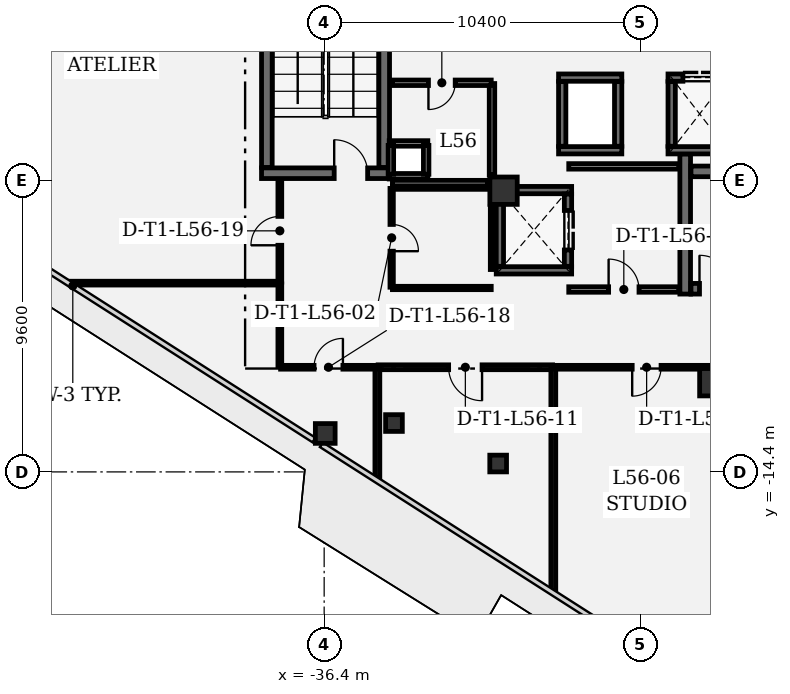
"""IFC4 building model, lengths in metres.
Left out: names, types, materials, properties, quantities, classifications, styles, units other than length and angle.
Written with IfcOpenShell. Run it as: python <this file> out.ifc"""

import sys

from ifc_helpers import new_model, si_unit, direction, frame, frame_2d, origin, origin_2d, place, context, subcontext, project, spatial, rectangle, extrude, element, fill, save


model = new_model("IFC4")
c1 = context("Model", 3, precision=1e-05, world=origin(), true_north=direction((0.0, 1.0)))
c2 = subcontext(c1, "Body", "Model", "MODEL_VIEW")
j1 = project(units=[si_unit("LENGTHUNIT", "METRE"), si_unit("PLANEANGLEUNIT", "RADIAN")], contexts=[c1])
p1 = place(None, origin())
s1 = spatial("IfcSite", under=j1, at=p1, CompositionType="ELEMENT")
p2 = place(p1, origin())
s2 = spatial("IfcBuilding", under=s1, at=p2, CompositionType="ELEMENT")
p3 = place(p2, frame((0.0, 0.0, 241.5)))
s3 = spatial("IfcBuildingStorey", under=s2, at=p3, CompositionType="ELEMENT", Elevation=241.5)
for number, where, z_axis, x_axis in (
    (1, (-23.6, -11.45, 0.0), (0.0, 0.0, 1.0), (1.0, 0.0, 0.0)),
    (2, (-30.5, -5.15, 0.0), (0.0, 0.0, 1.0), (1.0, 0.0, 0.0)),
):
    element("IfcColumn", number, at=place(p3, frame(where, z_axis=z_axis, x_axis=x_axis)), inside=s3, PredefinedType="COLUMN", context=c2, shape_type="SweptSolid", body=[
        extrude(rectangle(XDim=0.9, YDim=0.9, at=origin_2d()), origin(), (0.0, 0.0, 1.0), 4.05),
    ])
p4 = place(p3, frame((-36.365, -13.135, 0.0), z_axis=(0.0, 0.0, 1.0), x_axis=(1.0, 0.0, 0.0)))
e3 = element("IfcColumn", 3, at=p4, inside=s3, PredefinedType="COLUMN", context=c2, shape_type="SweptSolid", body=[
    extrude(rectangle(XDim=0.65, YDim=0.65, at=origin_2d()), origin(), (0.0, 0.0, 1.0), 4.05),
])
for number, where, z_axis, x_axis in (
    (4, (-34.104, -12.792, 0.0), (0.0, 0.0, 1.0), (1.0, 0.0, 0.0)),
    (5, (-30.677, -14.124, 0.0), (0.0, 0.0, 1.0), (1.0, 0.0, 0.0)),
):
    element("IfcColumn", number, at=place(p3, frame(where, z_axis=z_axis, x_axis=x_axis)), inside=s3, PredefinedType="COLUMN", context=c2, shape_type="SweptSolid", body=[
        extrude(rectangle(XDim=0.55, YDim=0.55, at=origin_2d()), origin(), (0.0, 0.0, 1.0), 4.05),
    ])
p5 = place(p3, frame((-24.525, -3.94, 0.0), z_axis=(0.0, 0.0, 1.0), x_axis=(0.0, -1.0, 0.0)))
e6 = element("IfcWall", 6, at=p5, inside=s3, PredefinedType="SHEAR", context=c2, shape_type="SweptSolid", body=[
    extrude(rectangle(XDim=4.61, YDim=0.35, at=frame_2d((2.305, 0.0))), origin(), (0.0, 0.0, 1.0), 3.78),
])
p6 = place(p3, frame((-24.335, -8.375, 0.0), z_axis=(0.0, 0.0, 1.0), x_axis=(1.0, 0.0, 0.0)))
e7 = element("IfcWall", 7, at=p6, inside=s3, PredefinedType="SHEAR", context=c2, shape_type="SweptSolid", body=[
    extrude(rectangle(XDim=8.12, YDim=0.35, at=frame_2d((4.06, 0.0))), origin(), (0.0, 0.0, 1.0), 3.78),
])
p7 = place(p6, frame((0.28, 0.0, 0.0)))
e8 = element("IfcOpeningElement", 8, at=p7, cuts=e7, PredefinedType="OPENING", context=c2, shape_type="SweptSolid", body=[
    extrude(rectangle(XDim=1.1, YDim=2.2, at=frame_2d((0.55, 1.1))), frame((0.0, 0.185, 0.0), z_axis=(0.0, -1.0, 0.0), x_axis=(1.0, 0.0, 0.0)), (0.0, 0.0, 1.0), 0.37),
])
p8 = place(p3, frame((-16.215, -4.515, 0.0), z_axis=(0.0, 0.0, 1.0), x_axis=(-1.0, 0.0, 0.0)))
e9 = element("IfcWall", 9, at=p8, inside=s3, PredefinedType="SHEAR", context=c2, shape_type="SweptSolid", body=[
    extrude(rectangle(XDim=8.12, YDim=0.35, at=frame_2d((4.06, 0.0))), origin(), (0.0, 0.0, 1.0), 3.78),
])
p9 = place(p3, frame((-38.46, -4.575, 0.0), z_axis=(0.0, 0.0, 1.0), x_axis=(1.0, 0.0, 0.0)))
e10 = element("IfcWall", 10, at=p9, inside=s3, PredefinedType="SHEAR", context=c2, shape_type="SweptSolid", body=[
    extrude(rectangle(XDim=4.21, YDim=0.35, at=frame_2d((2.105, 0.0))), origin(), (0.0, 0.0, 1.0), 3.78),
])
p10 = place(p9, frame((2.39, 0.0, 0.0)))
e11 = element("IfcOpeningElement", 11, at=p10, cuts=e10, PredefinedType="OPENING", context=c2, shape_type="SweptSolid", body=[
    extrude(rectangle(XDim=1.1, YDim=2.2, at=frame_2d((0.55, 1.1))), frame((0.0, 0.185, 0.0), z_axis=(0.0, -1.0, 0.0), x_axis=(1.0, 0.0, 0.0)), (0.0, 0.0, 1.0), 0.37),
])
for number, where, z_axis, x_axis in (
    (12, (-34.425, -4.385, 0.0), (0.0, 0.0, 1.0), (0.0, 1.0, 0.0)),
    (13, (-38.285, 4.385, 0.0), (0.0, 0.0, 1.0), (0.0, -1.0, 0.0)),
):
    element("IfcWall", number, at=place(p3, frame(where, z_axis=z_axis, x_axis=x_axis)), inside=s3, PredefinedType="SHEAR", context=c2, shape_type="SweptSolid", body=[
        extrude(rectangle(XDim=8.77, YDim=0.35, at=frame_2d((4.385, 0.0))), origin(), (0.0, 0.0, 1.0), 3.78),
    ])
for number, where, z_axis, x_axis in (
    (14, (-28.26, -7.77, 0.0), (0.0, 0.0, 1.0), (-1.0, 0.0, 0.0)),
    (15, (-30.74, -5.13, 0.0), (0.0, 0.0, 1.0), (1.0, 0.0, 0.0)),
):
    element("IfcWall", number, at=place(p3, frame(where, z_axis=z_axis, x_axis=x_axis)), inside=s3, PredefinedType="SHEAR", context=c2, shape_type="SweptSolid", body=[
        extrude(rectangle(XDim=2.48, YDim=0.24, at=frame_2d((1.24, 0.0))), origin(), (0.0, 0.0, 1.0), 3.78),
    ])
p11 = place(p3, frame((-30.62, -7.638, 0.0), z_axis=(0.0, 0.0, 1.0), x_axis=(0.0, 1.0, 0.0)))
e16 = element("IfcWall", 16, at=p11, inside=s3, PredefinedType="SHEAR", context=c2, shape_type="SweptSolid", body=[
    extrude(rectangle(XDim=2.376, YDim=0.24, at=frame_2d((1.188, 0.0))), origin(), (0.0, 0.0, 1.0), 3.78),
])
p12 = place(p3, frame((-28.38, -5.262, 0.0), z_axis=(0.0, 0.0, 1.0), x_axis=(0.0, -1.0, 0.0)))
e17 = element("IfcWall", 17, at=p12, inside=s3, PredefinedType="SHEAR", context=c2, shape_type="SweptSolid", body=[
    extrude(rectangle(XDim=2.376, YDim=0.24, at=frame_2d((1.188, 0.0))), origin(), (0.0, 0.0, 1.0), 3.78),
])
p13 = place(p12, frame((0.538, 0.0, 0.0)))
e18 = element("IfcOpeningElement", 18, at=p13, cuts=e17, PredefinedType="OPENING", context=c2, shape_type="SweptSolid", body=[
    extrude(rectangle(XDim=1.3, YDim=2.3, at=frame_2d((0.65, 1.15))), frame((0.0, 0.13, 0.0), z_axis=(0.0, -1.0, 0.0), x_axis=(1.0, 0.0, 0.0)), (0.0, 0.0, 1.0), 0.26),
])
for number, where, z_axis, x_axis in (
    (19, (-26.61, -3.82, 0.0), (0.0, 0.0, 1.0), (-1.0, 0.0, 0.0)),
    (20, (-28.69, -1.43, 0.0), (0.0, 0.0, 1.0), (1.0, 0.0, 0.0)),
):
    element("IfcWall", number, at=place(p3, frame(where, z_axis=z_axis, x_axis=x_axis)), inside=s3, PredefinedType="SHEAR", context=c2, shape_type="SweptSolid", body=[
        extrude(rectangle(XDim=2.08, YDim=0.24, at=frame_2d((1.04, 0.0))), origin(), (0.0, 0.0, 1.0), 3.78),
    ])
for number, where, z_axis, x_axis in (
    (21, (-28.57, -3.688, 0.0), (0.0, 0.0, 1.0), (0.0, 1.0, 0.0)),
    (22, (-26.73, -1.562, 0.0), (0.0, 0.0, 1.0), (0.0, -1.0, 0.0)),
):
    element("IfcWall", number, at=place(p3, frame(where, z_axis=z_axis, x_axis=x_axis)), inside=s3, PredefinedType="SHEAR", context=c2, shape_type="SweptSolid", body=[
        extrude(rectangle(XDim=2.126, YDim=0.24, at=frame_2d((1.063, 0.0))), origin(), (0.0, 0.0, 1.0), 3.78),
    ])
p14 = place(p3, frame((-23.01, -3.82, 0.0), z_axis=(0.0, 0.0, 1.0), x_axis=(-1.0, 0.0, 0.0)))
e23 = element("IfcWall", 23, at=p14, inside=s3, PredefinedType="SHEAR", context=c2, shape_type="SweptSolid", body=[
    extrude(rectangle(XDim=2.08, YDim=0.24, at=frame_2d((1.04, 0.0))), origin(), (0.0, 0.0, 1.0), 3.78),
])
p15 = place(p3, frame((-25.09, -1.43, 0.0), z_axis=(0.0, 0.0, 1.0), x_axis=(1.0, 0.0, 0.0)))
e24 = element("IfcWall", 24, at=p15, inside=s3, PredefinedType="SHEAR", context=c2, shape_type="SweptSolid", body=[
    extrude(rectangle(XDim=2.08, YDim=0.24, at=frame_2d((1.04, 0.0))), origin(), (0.0, 0.0, 1.0), 3.78),
])
p16 = place(p15, frame((0.49, 0.0, 0.0)))
e25 = element("IfcOpeningElement", 25, at=p16, cuts=e24, PredefinedType="OPENING", context=c2, shape_type="SweptSolid", body=[
    extrude(rectangle(XDim=1.1, YDim=2.2, at=frame_2d((0.55, 1.1))), frame((0.0, 0.13, 0.0), z_axis=(0.0, -1.0, 0.0), x_axis=(1.0, 0.0, 0.0)), (0.0, 0.0, 1.0), 0.26),
])
p17 = place(p3, frame((-24.97, -3.688, 0.0), z_axis=(0.0, 0.0, 1.0), x_axis=(0.0, 1.0, 0.0)))
e26 = element("IfcWall", 26, at=p17, inside=s3, PredefinedType="SHEAR", context=c2, shape_type="SweptSolid", body=[
    extrude(rectangle(XDim=2.126, YDim=0.24, at=frame_2d((1.063, 0.0))), origin(), (0.0, 0.0, 1.0), 3.78),
])
for number, where, z_axis, x_axis in (
    (27, (-32.99, -4.675, 0.0), (0.0, 0.0, 1.0), (-1.0, 0.0, 0.0)),
    (28, (-34.26, -3.595, 0.0), (0.0, 0.0, 1.0), (1.0, 0.0, 0.0)),
):
    element("IfcWall", number, at=place(p3, frame(where, z_axis=z_axis, x_axis=x_axis)), inside=s3, PredefinedType="PARTITIONING", context=c2, shape_type="SweptSolid", body=[
        extrude(rectangle(XDim=1.27, YDim=0.18, at=frame_2d((0.635, 0.0))), origin(), (0.0, 0.0, 1.0), 3.78),
    ])
for number, where, z_axis, x_axis in (
    (29, (-34.205, -4.61, 0.0), (0.0, 0.0, 1.0), (0.0, 1.0, 0.0)),
    (30, (-33.045, -3.66, 0.0), (0.0, 0.0, 1.0), (0.0, -1.0, 0.0)),
):
    element("IfcWall", number, at=place(p3, frame(where, z_axis=z_axis, x_axis=x_axis)), inside=s3, PredefinedType="PARTITIONING", context=c2, shape_type="SweptSolid", body=[
        extrude(rectangle(XDim=0.95, YDim=0.18, at=frame_2d((0.475, 0.0))), origin(), (0.0, 0.0, 1.0), 3.78),
    ])
p18 = place(p3, frame((-28.355, -8.4, 0.0), z_axis=(0.0, 0.0, 1.0), x_axis=(1.0, 0.0, 0.0)))
e31 = element("IfcWall", 31, at=p18, inside=s3, PredefinedType="PARTITIONING", context=c2, shape_type="SweptSolid", body=[
    extrude(rectangle(XDim=3.622, YDim=0.18, at=frame_2d((1.811, 0.0))), origin(), (0.0, 0.0, 1.0), 3.78),
])
p19 = place(p18, frame((1.311, 0.0, 0.0)))
e32 = element("IfcOpeningElement", 32, at=p19, cuts=e31, PredefinedType="OPENING", context=c2, shape_type="SweptSolid", body=[
    extrude(rectangle(XDim=1.0, YDim=2.15, at=frame_2d((0.5, 1.075))), frame((0.0, 0.1, 0.0), z_axis=(0.0, -1.0, 0.0), x_axis=(1.0, 0.0, 0.0)), (0.0, 0.0, 1.0), 0.2),
])
p20 = place(p3, frame((-24.733, -4.35, 0.0), z_axis=(0.0, 0.0, 1.0), x_axis=(-1.0, 0.0, 0.0)))
e33 = element("IfcWall", 33, at=p20, inside=s3, PredefinedType="PARTITIONING", context=c2, shape_type="SweptSolid", body=[
    extrude(rectangle(XDim=3.622, YDim=0.18, at=frame_2d((1.811, 0.0))), origin(), (0.0, 0.0, 1.0), 3.78),
])
p21 = place(p3, frame((-34.155, -8.35, 0.0), z_axis=(0.0, 0.0, 1.0), x_axis=(1.0, 0.0, 0.0)))
e34 = element("IfcWall", 34, at=p21, inside=s3, PredefinedType="PARTITIONING", context=c2, shape_type="SweptSolid", body=[
    extrude(rectangle(XDim=3.25, YDim=0.11, at=frame_2d((1.625, 0.0))), origin(), (0.0, 0.0, 1.0), 3.344),
])
p22 = place(p3, frame((-30.88, -7.743, 0.0), z_axis=(0.0, 0.0, 1.0), x_axis=(0.0, 1.0, 0.0)))
e35 = element("IfcWall", 35, at=p22, inside=s3, PredefinedType="PARTITIONING", context=c2, shape_type="SweptSolid", body=[
    extrude(rectangle(XDim=2.078, YDim=0.11, at=frame_2d((1.039, 0.0))), origin(), (0.0, 0.0, 1.0), 3.78),
])
p23 = place(p3, frame((-31.015, -5.05, 0.0), z_axis=(0.0, 0.0, 1.0), x_axis=(-1.0, 0.0, 0.0)))
e36 = element("IfcWall", 36, at=p23, inside=s3, PredefinedType="PARTITIONING", context=c2, shape_type="SweptSolid", body=[
    extrude(rectangle(XDim=3.14, YDim=0.11, at=frame_2d((1.57, 0.0))), origin(), (0.0, 0.0, 1.0), 3.78),
])
p24 = place(p3, frame((-34.18, -5.075, 0.0), z_axis=(0.0, 0.0, 1.0), x_axis=(0.0, -1.0, 0.0)))
e37 = element("IfcWall", 37, at=p24, inside=s3, PredefinedType="PARTITIONING", context=c2, shape_type="SweptSolid", body=[
    extrude(rectangle(XDim=3.25, YDim=0.11, at=frame_2d((1.625, 0.0))), origin(), (0.0, 0.0, 1.0), 3.78),
])
p25 = place(p24, frame((1.185, 0.0, 0.0)))
e38 = element("IfcOpeningElement", 38, at=p25, cuts=e37, PredefinedType="OPENING", context=c2, shape_type="SweptSolid", body=[
    extrude(rectangle(XDim=0.88, YDim=2.1, at=frame_2d((0.44, 1.05))), frame((0.0, 0.065, 0.0), z_axis=(0.0, -1.0, 0.0), x_axis=(1.0, 0.0, 0.0)), (0.0, 0.0, 1.0), 0.13),
])
p26 = place(p3, frame((-34.155, -4.9, 0.0), z_axis=(0.0, 0.0, 1.0), x_axis=(1.0, 0.0, 0.0)))
e39 = element("IfcWall", 39, at=p26, inside=s3, PredefinedType="PARTITIONING", context=c2, shape_type="SweptSolid", body=[
    extrude(rectangle(XDim=3.14, YDim=0.18, at=frame_2d((1.57, 0.0))), origin(), (0.0, 0.0, 1.0), 3.78),
])
p27 = place(p3, frame((-30.88, -4.635, 0.0), z_axis=(0.0, 0.0, 1.0), x_axis=(0.0, 1.0, 0.0)))
e40 = element("IfcWall", 40, at=p27, inside=s3, PredefinedType="PARTITIONING", context=c2, shape_type="SweptSolid", body=[
    extrude(rectangle(XDim=3.01, YDim=0.18, at=frame_2d((1.505, 0.0))), origin(), (0.0, 0.0, 1.0), 3.78),
])
p28 = place(p3, frame((-30.905, -1.6, 0.0), z_axis=(0.0, 0.0, 1.0), x_axis=(-1.0, 0.0, 0.0)))
e41 = element("IfcWall", 41, at=p28, inside=s3, PredefinedType="PARTITIONING", context=c2, shape_type="SweptSolid", body=[
    extrude(rectangle(XDim=3.25, YDim=0.18, at=frame_2d((1.625, 0.0))), origin(), (0.0, 0.0, 1.0), 3.78),
])
p29 = place(p28, frame((1.185, 0.0, 0.0)))
e42 = element("IfcOpeningElement", 42, at=p29, cuts=e41, PredefinedType="OPENING", context=c2, shape_type="SweptSolid", body=[
    extrude(rectangle(XDim=0.88, YDim=2.1, at=frame_2d((0.44, 1.05))), frame((0.0, 0.1, 0.0), z_axis=(0.0, -1.0, 0.0), x_axis=(1.0, 0.0, 0.0)), (0.0, 0.0, 1.0), 0.2),
])
p30 = place(p3, frame((-28.888, -10.958, 0.0), z_axis=(0.0, 0.0, 1.0), x_axis=(-1.0, 0.0, 0.0)))
e43 = element("IfcWall", 43, at=p30, inside=s3, PredefinedType="PARTITIONING", context=c2, shape_type="SweptSolid", body=[
    extrude(rectangle(XDim=5.737, YDim=0.16, at=frame_2d((2.869, 0.0))), origin(), (0.0, 0.0, 1.0), 3.0),
])
p31 = place(p30, frame((2.319, 0.0, 0.0)))
e44 = element("IfcOpeningElement", 44, at=p31, cuts=e43, PredefinedType="OPENING", context=c2, shape_type="SweptSolid", body=[
    extrude(rectangle(XDim=1.1, YDim=2.15, at=frame_2d((0.55, 1.075))), frame((0.0, 0.09, 0.0), z_axis=(0.0, -1.0, 0.0), x_axis=(1.0, 0.0, 0.0)), (0.0, 0.0, 1.0), 0.18),
])
p32 = place(p3, frame((-34.65, -10.983, 0.0), z_axis=(0.0, 0.0, 1.0), x_axis=(0.0, -1.0, 0.0)))
e45 = element("IfcWall", 45, at=p32, inside=s3, PredefinedType="PARTITIONING", context=c2, shape_type="SweptSolid", body=[
    extrude(rectangle(XDim=3.621, YDim=0.16, at=frame_2d((1.81, 0.0))), origin(), (0.0, 0.0, 1.0), 3.78),
])
p33 = place(p3, frame((-28.863, -18.302, 0.0), z_axis=(0.0, 0.0, 1.0), x_axis=(0.0, 1.0, 0.0)))
e46 = element("IfcWall", 46, at=p33, inside=s3, PredefinedType="PARTITIONING", context=c2, shape_type="SweptSolid", body=[
    extrude(rectangle(XDim=7.319, YDim=0.16, at=frame_2d((3.66, 0.0))), origin(), (0.0, 0.0, 1.0), 3.78),
])
p34 = place(p3, frame((-22.758, -10.958, 0.0), z_axis=(0.0, 0.0, 1.0), x_axis=(-1.0, 0.0, 0.0)))
e47 = element("IfcWall", 47, at=p34, inside=s3, PredefinedType="PARTITIONING", context=c2, shape_type="SweptSolid", body=[
    extrude(rectangle(XDim=6.072, YDim=0.125, at=frame_2d((3.036, 0.0))), origin(), (0.0, 0.0, 1.0), 3.78),
])
p35 = place(p34, frame((2.561, 0.0, 0.0)))
e48 = element("IfcOpeningElement", 48, at=p35, cuts=e47, PredefinedType="OPENING", context=c2, shape_type="SweptSolid", body=[
    extrude(rectangle(XDim=0.95, YDim=2.15, at=frame_2d((0.475, 1.075))), frame((0.0, 0.073, 0.0), z_axis=(0.0, -1.0, 0.0), x_axis=(1.0, 0.0, 0.0)), (0.0, 0.0, 1.0), 0.145),
])
p36 = place(p3, frame((-37.833, -10.958, 0.0), z_axis=(0.0, 0.0, 1.0), x_axis=(1.0, 0.0, 0.0)))
e49 = element("IfcWall", 49, at=p36, inside=s3, PredefinedType="PARTITIONING", context=c2, shape_type="SweptSolid", body=[
    extrude(rectangle(XDim=3.15, YDim=0.125, at=frame_2d((1.575, 0.0))), origin(), (0.0, 0.0, 1.0), 3.0),
])
p37 = place(p36, frame((1.1, 0.0, 0.0)))
e50 = element("IfcOpeningElement", 50, at=p37, cuts=e49, PredefinedType="OPENING", context=c2, shape_type="SweptSolid", body=[
    extrude(rectangle(XDim=0.95, YDim=2.15, at=frame_2d((0.475, 1.075))), frame((0.0, 0.073, 0.0), z_axis=(0.0, -1.0, 0.0), x_axis=(1.0, 0.0, 0.0)), (0.0, 0.0, 1.0), 0.145),
])
p38 = place(p3, frame((-37.858, -10.933, 0.0), z_axis=(0.0, 0.0, 1.0), x_axis=(0.0, 1.0, 0.0)))
e51 = element("IfcWall", 51, at=p38, inside=s3, PredefinedType="PARTITIONING", context=c2, shape_type="SweptSolid", body=[
    extrude(rectangle(XDim=2.717, YDim=0.125, at=frame_2d((1.359, 0.0))), origin(), (0.0, 0.0, 1.0), 3.78),
])
p39 = place(p3, frame((-37.883, -8.191, 0.0), z_axis=(0.0, 0.0, 1.0), x_axis=(-1.0, 0.0, 0.0)))
e52 = element("IfcWall", 52, at=p39, inside=s3, PredefinedType="PARTITIONING", context=c2, shape_type="SweptSolid", body=[
    extrude(rectangle(XDim=6.846, YDim=0.125, at=frame_2d((3.423, 0.0))), origin(), (0.0, 0.0, 1.0), 3.0),
])
p40 = place(p3, frame((-37.858, -8.158, 0.0), z_axis=(0.0, 0.0, 1.0), x_axis=(0.0, 1.0, 0.0)))
e53 = element("IfcWall", 53, at=p40, inside=s3, PredefinedType="PARTITIONING", context=c2, shape_type="SweptSolid", body=[
    extrude(rectangle(XDim=3.375, YDim=0.125, at=frame_2d((1.687, 0.0))), origin(), (0.0, 0.0, 1.0), 3.78),
])
p41 = place(p40, frame((1.212, 0.0, 0.0)))
e54 = element("IfcOpeningElement", 54, at=p41, cuts=e53, PredefinedType="OPENING", context=c2, shape_type="SweptSolid", body=[
    extrude(rectangle(XDim=0.95, YDim=2.15, at=frame_2d((0.475, 1.075))), frame((0.0, 0.073, 0.0), z_axis=(0.0, -1.0, 0.0), x_axis=(1.0, 0.0, 0.0)), (0.0, 0.0, 1.0), 0.145),
])
p42 = place(p7, origin())
e55 = element("IfcDoor", 55, at=p42, inside=s3, OperationType="SINGLE_SWING_LEFT", PredefinedType="DOOR", context=c2, shape_type="SweptSolid", body=[
    extrude(rectangle(XDim=1.1, YDim=2.2, at=frame_2d((0.55, 1.1))), frame((0.0, 0.025, 0.0), z_axis=(0.0, -1.0, 0.0), x_axis=(1.0, 0.0, 0.0)), (0.0, 0.0, 1.0), 0.05),
])
fill(e8, e55)
p43 = place(p10, origin())
e56 = element("IfcDoor", 56, at=p43, inside=s3, OperationType="SINGLE_SWING_LEFT", PredefinedType="DOOR", context=c2, shape_type="SweptSolid", body=[
    extrude(rectangle(XDim=1.1, YDim=2.2, at=frame_2d((0.55, 1.1))), frame((0.0, 0.025, 0.0), z_axis=(0.0, -1.0, 0.0), x_axis=(1.0, 0.0, 0.0)), (0.0, 0.0, 1.0), 0.05),
])
fill(e11, e56)
p44 = place(p13, origin())
e57 = element("IfcDoor", 57, at=p44, inside=s3, OperationType="DOUBLE_DOOR_SLIDING", PredefinedType="DOOR", context=c2, shape_type="SweptSolid", body=[
    extrude(rectangle(XDim=1.3, YDim=2.3, at=frame_2d((0.65, 1.15))), frame((0.0, 0.025, 0.0), z_axis=(0.0, -1.0, 0.0), x_axis=(1.0, 0.0, 0.0)), (0.0, 0.0, 1.0), 0.05),
])
fill(e18, e57)
p45 = place(p16, origin())
e58 = element("IfcDoor", 58, at=p45, inside=s3, OperationType="DOUBLE_DOOR_SLIDING", PredefinedType="DOOR", context=c2, shape_type="SweptSolid", body=[
    extrude(rectangle(XDim=1.1, YDim=2.2, at=frame_2d((0.55, 1.1))), frame((0.0, 0.025, 0.0), z_axis=(0.0, -1.0, 0.0), x_axis=(1.0, 0.0, 0.0)), (0.0, 0.0, 1.0), 0.05),
])
fill(e25, e58)
p46 = place(p25, origin())
e59 = element("IfcDoor", 59, at=p46, inside=s3, OperationType="SINGLE_SWING_RIGHT", PredefinedType="DOOR", context=c2, shape_type="SweptSolid", body=[
    extrude(rectangle(XDim=0.88, YDim=2.1, at=frame_2d((0.44, 1.05))), frame((0.0, 0.025, 0.0), z_axis=(0.0, -1.0, 0.0), x_axis=(1.0, 0.0, 0.0)), (0.0, 0.0, 1.0), 0.05),
])
fill(e38, e59)
p47 = place(p29, origin())
e60 = element("IfcDoor", 60, at=p47, inside=s3, OperationType="SINGLE_SWING_RIGHT", PredefinedType="DOOR", context=c2, shape_type="SweptSolid", body=[
    extrude(rectangle(XDim=0.88, YDim=2.1, at=frame_2d((0.44, 1.05))), frame((0.0, 0.025, 0.0), z_axis=(0.0, -1.0, 0.0), x_axis=(1.0, 0.0, 0.0)), (0.0, 0.0, 1.0), 0.05),
])
fill(e42, e60)
p48 = place(p31, origin())
e61 = element("IfcDoor", 61, at=p48, inside=s3, OperationType="SINGLE_SWING_LEFT", PredefinedType="DOOR", context=c2, shape_type="SweptSolid", body=[
    extrude(rectangle(XDim=1.1, YDim=2.15, at=frame_2d((0.55, 1.075))), frame((0.0, 0.025, 0.0), z_axis=(0.0, -1.0, 0.0), x_axis=(1.0, 0.0, 0.0)), (0.0, 0.0, 1.0), 0.05),
])
fill(e44, e61)
p49 = place(p35, origin())
e62 = element("IfcDoor", 62, at=p49, inside=s3, OperationType="SINGLE_SWING_RIGHT", PredefinedType="DOOR", context=c2, shape_type="SweptSolid", body=[
    extrude(rectangle(XDim=0.95, YDim=2.15, at=frame_2d((0.475, 1.075))), frame((0.0, 0.025, 0.0), z_axis=(0.0, -1.0, 0.0), x_axis=(1.0, 0.0, 0.0)), (0.0, 0.0, 1.0), 0.05),
])
fill(e48, e62)
p50 = place(p37, origin())
e63 = element("IfcDoor", 63, at=p50, inside=s3, OperationType="SINGLE_SWING_RIGHT", PredefinedType="DOOR", context=c2, shape_type="SweptSolid", body=[
    extrude(rectangle(XDim=0.95, YDim=2.15, at=frame_2d((0.475, 1.075))), frame((0.0, 0.025, 0.0), z_axis=(0.0, -1.0, 0.0), x_axis=(1.0, 0.0, 0.0)), (0.0, 0.0, 1.0), 0.05),
])
fill(e50, e63)
p51 = place(p41, origin())
e64 = element("IfcDoor", 64, at=p51, inside=s3, OperationType="SINGLE_SWING_LEFT", PredefinedType="DOOR", context=c2, shape_type="SweptSolid", body=[
    extrude(rectangle(XDim=0.95, YDim=2.15, at=frame_2d((0.475, 1.075))), frame((0.0, 0.025, 0.0), z_axis=(0.0, -1.0, 0.0), x_axis=(1.0, 0.0, 0.0)), (0.0, 0.0, 1.0), 0.05),
])
fill(e54, e64)
p52 = place(p19, origin())
e65 = element("IfcDoor", 65, at=p52, inside=s3, OperationType="SINGLE_SWING_LEFT", PredefinedType="DOOR", context=c2, shape_type="SweptSolid", body=[
    extrude(rectangle(XDim=1.0, YDim=2.15, at=frame_2d((0.5, 1.075))), frame((0.0, 0.025, 0.0), z_axis=(0.0, -1.0, 0.0), x_axis=(1.0, 0.0, 0.0)), (0.0, 0.0, 1.0), 0.05),
])
fill(e32, e65)
save(model, sys.argv[1])
